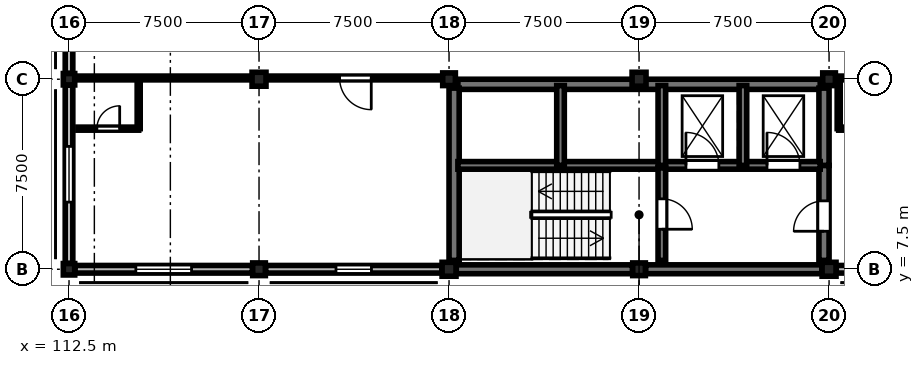
"""IFC4 building model, lengths in metres.
Left out: names, types, materials, properties, quantities, classifications, styles, units other than length and angle.
Written with IfcOpenShell. Run it as: python <this file> out.ifc"""

import sys

from ifc_helpers import new_model, si_unit, direction, frame, frame_2d, origin, origin_2d, place, context, subcontext, project, spatial, rectangle, extrude, element, fill, save


model = new_model("IFC4")
c1 = context("Model", 3, precision=1e-05, world=origin(), true_north=direction((0.0, 1.0)))
c2 = subcontext(c1, "Body", "Model", "MODEL_VIEW")
j1 = project(units=[si_unit("LENGTHUNIT", "METRE"), si_unit("PLANEANGLEUNIT", "RADIAN")], contexts=[c1])
p1 = place(None, origin())
s1 = spatial("IfcSite", under=j1, at=p1, CompositionType="ELEMENT")
p2 = place(p1, origin())
s2 = spatial("IfcBuilding", under=s1, at=p2, CompositionType="ELEMENT")
p3 = place(p2, frame((0.0, 0.0, 17.85)))
s3 = spatial("IfcBuildingStorey", under=s2, at=p3, CompositionType="ELEMENT", Elevation=17.85)
for number, where, z_axis, x_axis in (
    (1, (112.5, 7.5, 0.0), (0.0, 0.0, 1.0), (1.0, 0.0, 0.0)),
    (2, (112.5, 15.0, 0.0), (0.0, 0.0, 1.0), (1.0, 0.0, 0.0)),
):
    element("IfcColumn", number, at=place(p3, frame(where, z_axis=z_axis, x_axis=x_axis)), inside=s3, PredefinedType="COLUMN", context=c2, shape_type="SweptSolid", body=[
        extrude(rectangle(XDim=0.45, YDim=0.45, at=origin_2d()), origin(), (0.0, 0.0, 1.0), 4.05),
    ])
p4 = place(p3, frame((120.0, 7.5, 0.0), z_axis=(0.0, 0.0, 1.0), x_axis=(1.0, 0.0, 0.0)))
e3 = element("IfcColumn", 3, at=p4, inside=s3, PredefinedType="COLUMN", context=c2, shape_type="SweptSolid", body=[
    extrude(rectangle(XDim=0.5, YDim=0.5, at=origin_2d()), origin(), (0.0, 0.0, 1.0), 4.05),
])
for number, where, z_axis, x_axis in (
    (4, (120.0, 15.0, 0.0), (0.0, 0.0, 1.0), (1.0, 0.0, 0.0)),
    (5, (127.5, 7.5, 0.0), (0.0, 0.0, 1.0), (1.0, 0.0, 0.0)),
):
    element("IfcColumn", number, at=place(p3, frame(where, z_axis=z_axis, x_axis=x_axis)), inside=s3, PredefinedType="COLUMN", context=c2, shape_type="SweptSolid", body=[
        extrude(rectangle(XDim=0.55, YDim=0.55, at=origin_2d()), origin(), (0.0, 0.0, 1.0), 4.05),
    ])
for number, where, z_axis, x_axis in (
    (6, (127.5, 15.0, 0.0), (0.0, 0.0, 1.0), (1.0, 0.0, 0.0)),
    (7, (135.0, 7.5, 0.0), (0.0, 0.0, 1.0), (1.0, 0.0, 0.0)),
):
    element("IfcColumn", number, at=place(p3, frame(where, z_axis=z_axis, x_axis=x_axis)), inside=s3, PredefinedType="COLUMN", context=c2, shape_type="SweptSolid", body=[
        extrude(rectangle(XDim=0.5, YDim=0.5, at=origin_2d()), origin(), (0.0, 0.0, 1.0), 4.05),
    ])
for number, where, z_axis, x_axis in (
    (8, (135.0, 15.0, 0.0), (0.0, 0.0, 1.0), (1.0, 0.0, 0.0)),
    (9, (142.5, 7.5, 0.0), (0.0, 0.0, 1.0), (1.0, 0.0, 0.0)),
):
    element("IfcColumn", number, at=place(p3, frame(where, z_axis=z_axis, x_axis=x_axis)), inside=s3, PredefinedType="COLUMN", context=c2, shape_type="SweptSolid", body=[
        extrude(rectangle(XDim=0.55, YDim=0.55, at=origin_2d()), origin(), (0.0, 0.0, 1.0), 4.05),
    ])
p5 = place(p3, frame((142.5, 15.0, 0.0), z_axis=(0.0, 0.0, 1.0), x_axis=(1.0, 0.0, 0.0)))
e10 = element("IfcColumn", 10, at=p5, inside=s3, PredefinedType="COLUMN", context=c2, shape_type="SweptSolid", body=[
    extrude(rectangle(XDim=0.5, YDim=0.5, at=origin_2d()), origin(), (0.0, 0.0, 1.0), 4.05),
])
p6 = place(p3, frame((119.74, 7.5, 0.0), z_axis=(0.0, 0.0, 1.0), x_axis=(-1.0, 0.0, 0.0)))
e11 = element("IfcWall", 11, at=p6, inside=s3, PredefinedType="STANDARD", context=c2, shape_type="SweptSolid", body=[
    extrude(rectangle(XDim=7.005, YDim=0.3, at=frame_2d((3.502, 0.0))), origin(), (0.0, 0.0, 1.0), 3.17),
])
p7 = place(p6, frame((2.403, 0.0, 0.9)))
e12 = element("IfcOpeningElement", 12, at=p7, cuts=e11, PredefinedType="OPENING", context=c2, shape_type="SweptSolid", body=[
    extrude(rectangle(XDim=2.2, YDim=1.95, at=frame_2d((1.1, 0.975))), frame((0.0, 0.16, 0.0), z_axis=(0.0, -1.0, 0.0), x_axis=(1.0, 0.0, 0.0)), (0.0, 0.0, 1.0), 0.32),
])
p8 = place(p3, frame((112.5, 7.735, 0.0), z_axis=(0.0, 0.0, 1.0), x_axis=(0.0, 1.0, 0.0)))
e13 = element("IfcWall", 13, at=p8, inside=s3, PredefinedType="STANDARD", context=c2, shape_type="SweptSolid", body=[
    extrude(rectangle(XDim=7.03, YDim=0.3, at=frame_2d((3.515, 0.0))), origin(), (0.0, 0.0, 1.0), 3.17),
])
p9 = place(p8, frame((2.415, 0.0, 0.9)))
e14 = element("IfcOpeningElement", 14, at=p9, cuts=e13, PredefinedType="OPENING", context=c2, shape_type="SweptSolid", body=[
    extrude(rectangle(XDim=2.2, YDim=1.95, at=frame_2d((1.1, 0.975))), frame((0.0, 0.16, 0.0), z_axis=(0.0, -1.0, 0.0), x_axis=(1.0, 0.0, 0.0)), (0.0, 0.0, 1.0), 0.32),
])
p10 = place(p3, frame((112.5, 15.235, 0.0), z_axis=(0.0, 0.0, 1.0), x_axis=(0.0, 1.0, 0.0)))
e15 = element("IfcWall", 15, at=p10, inside=s3, PredefinedType="STANDARD", context=c2, shape_type="SweptSolid", body=[
    extrude(rectangle(XDim=7.115, YDim=0.3, at=frame_2d((3.558, 0.0))), origin(), (0.0, 0.0, 1.0), 3.17),
])
p11 = place(p10, frame((2.857, 0.0, 0.9)))
e16 = element("IfcOpeningElement", 16, at=p11, cuts=e15, PredefinedType="OPENING", context=c2, shape_type="SweptSolid", body=[
    extrude(rectangle(XDim=1.4, YDim=1.8, at=frame_2d((0.7, 0.9))), frame((0.0, 0.16, 0.0), z_axis=(0.0, -1.0, 0.0), x_axis=(1.0, 0.0, 0.0)), (0.0, 0.0, 1.0), 0.32),
])
p12 = place(p3, frame((127.215, 7.5, 0.0), z_axis=(0.0, 0.0, 1.0), x_axis=(-1.0, 0.0, 0.0)))
e17 = element("IfcWall", 17, at=p12, inside=s3, PredefinedType="STANDARD", context=c2, shape_type="SweptSolid", body=[
    extrude(rectangle(XDim=6.955, YDim=0.3, at=frame_2d((3.478, 0.0))), origin(), (0.0, 0.0, 1.0), 3.17),
])
p13 = place(p12, frame((2.778, 0.0, 0.9)))
e18 = element("IfcOpeningElement", 18, at=p13, cuts=e17, PredefinedType="OPENING", context=c2, shape_type="SweptSolid", body=[
    extrude(rectangle(XDim=1.4, YDim=1.8, at=frame_2d((0.7, 0.9))), frame((0.0, 0.16, 0.0), z_axis=(0.0, -1.0, 0.0), x_axis=(1.0, 0.0, 0.0)), (0.0, 0.0, 1.0), 0.32),
])
for number, where, z_axis, x_axis in (
    (19, (134.74, 7.5, 0.0), (0.0, 0.0, 1.0), (-1.0, 0.0, 0.0)),
    (20, (142.215, 7.5, 0.0), (0.0, 0.0, 1.0), (-1.0, 0.0, 0.0)),
):
    element("IfcWall", number, at=place(p3, frame(where, z_axis=z_axis, x_axis=x_axis)), inside=s3, PredefinedType="SHEAR", context=c2, shape_type="SweptSolid", body=[
        extrude(rectangle(XDim=6.955, YDim=0.35, at=frame_2d((3.478, 0.0))), origin(), (0.0, 0.0, 1.0), 3.77),
    ])
p14 = place(p3, frame((149.74, 7.5, 0.0), z_axis=(0.0, 0.0, 1.0), x_axis=(-1.0, 0.0, 0.0)))
e21 = element("IfcWall", 21, at=p14, inside=s3, PredefinedType="STANDARD", context=c2, shape_type="SweptSolid", body=[
    extrude(rectangle(XDim=6.955, YDim=0.3, at=frame_2d((3.478, 0.0))), origin(), (0.0, 0.0, 1.0), 3.17),
])
p15 = place(p14, frame((2.577, 0.0, 0.9)))
e22 = element("IfcOpeningElement", 22, at=p15, cuts=e21, PredefinedType="OPENING", context=c2, shape_type="SweptSolid", body=[
    extrude(rectangle(XDim=1.8, YDim=1.99, at=frame_2d((0.9, 0.995))), frame((0.0, 0.16, 0.0), z_axis=(0.0, -1.0, 0.0), x_axis=(1.0, 0.0, 0.0)), (0.0, 0.0, 1.0), 0.32),
])
p16 = place(p3, frame((127.85, 14.8, 0.0), z_axis=(0.0, 0.0, 1.0), x_axis=(1.0, 0.0, 0.0)))
e23 = element("IfcWall", 23, at=p16, inside=s3, PredefinedType="SHEAR", context=c2, shape_type="SweptSolid", body=[
    extrude(rectangle(XDim=14.3, YDim=0.4, at=frame_2d((7.15, 0.0))), origin(), (0.0, 0.0, 1.0), 3.77),
])
p17 = place(p3, frame((127.7, 7.85, 0.0), z_axis=(0.0, 0.0, 1.0), x_axis=(0.0, 1.0, 0.0)))
e24 = element("IfcWall", 24, at=p17, inside=s3, PredefinedType="SHEAR", context=c2, shape_type="SweptSolid", body=[
    extrude(rectangle(XDim=6.8, YDim=0.4, at=frame_2d((3.4, 0.0))), origin(), (0.0, 0.0, 1.0), 3.77),
])
p18 = place(p3, frame((142.3, 7.85, 0.0), z_axis=(0.0, 0.0, 1.0), x_axis=(0.0, 1.0, 0.0)))
e25 = element("IfcWall", 25, at=p18, inside=s3, PredefinedType="SHEAR", context=c2, shape_type="SweptSolid", body=[
    extrude(rectangle(XDim=3.75, YDim=0.4, at=frame_2d((1.875, 0.0))), origin(), (0.0, 0.0, 1.0), 3.77),
])
p19 = place(p18, frame((1.15, 0.0, 0.0)))
e26 = element("IfcOpeningElement", 26, at=p19, cuts=e25, PredefinedType="OPENING", context=c2, shape_type="SweptSolid", body=[
    extrude(rectangle(XDim=1.2, YDim=2.25, at=frame_2d((0.6, 1.125))), frame((0.0, 0.21, 0.0), z_axis=(0.0, -1.0, 0.0), x_axis=(1.0, 0.0, 0.0)), (0.0, 0.0, 1.0), 0.42),
])
p20 = place(p3, frame((142.3, 11.6, 0.0), z_axis=(0.0, 0.0, 1.0), x_axis=(0.0, 1.0, 0.0)))
e27 = element("IfcWall", 27, at=p20, inside=s3, PredefinedType="SHEAR", context=c2, shape_type="SweptSolid", body=[
    extrude(rectangle(XDim=3.05, YDim=0.4, at=frame_2d((1.525, 0.0))), origin(), (0.0, 0.0, 1.0), 3.77),
])
p21 = place(p3, frame((127.85, 11.6, 0.0), z_axis=(0.0, 0.0, 1.0), x_axis=(1.0, 0.0, 0.0)))
e28 = element("IfcWall", 28, at=p21, inside=s3, PredefinedType="SHEAR", context=c2, shape_type="SweptSolid", body=[
    extrude(rectangle(XDim=8.05, YDim=0.3, at=frame_2d((4.025, 0.0))), origin(), (0.0, 0.0, 1.0), 3.77),
])
p22 = place(p3, frame((135.9, 11.6, 0.0), z_axis=(0.0, 0.0, 1.0), x_axis=(1.0, 0.0, 0.0)))
e29 = element("IfcWall", 29, at=p22, inside=s3, PredefinedType="SHEAR", context=c2, shape_type="SweptSolid", body=[
    extrude(rectangle(XDim=6.25, YDim=0.3, at=frame_2d((3.125, 0.0))), origin(), (0.0, 0.0, 1.0), 3.77),
])
p23 = place(p22, frame((0.95, 0.0, 0.0)))
e30 = element("IfcOpeningElement", 30, at=p23, cuts=e29, PredefinedType="OPENING", context=c2, shape_type="SweptSolid", body=[
    extrude(rectangle(XDim=1.3, YDim=2.2, at=frame_2d((0.65, 1.1))), frame((0.0, 0.16, 0.0), z_axis=(0.0, -1.0, 0.0), x_axis=(1.0, 0.0, 0.0)), (0.0, 0.0, 1.0), 0.32),
])
p24 = place(p22, frame((4.15, 0.0, 0.0)))
e31 = element("IfcOpeningElement", 31, at=p24, cuts=e29, PredefinedType="OPENING", context=c2, shape_type="SweptSolid", body=[
    extrude(rectangle(XDim=1.3, YDim=2.2, at=frame_2d((0.65, 1.1))), frame((0.0, 0.16, 0.0), z_axis=(0.0, -1.0, 0.0), x_axis=(1.0, 0.0, 0.0)), (0.0, 0.0, 1.0), 0.32),
])
p25 = place(p3, frame((135.9, 11.5, 0.0), z_axis=(0.0, 0.0, 1.0), x_axis=(0.0, -1.0, 0.0)))
e32 = element("IfcWall", 32, at=p25, inside=s3, PredefinedType="SHEAR", context=c2, shape_type="SweptSolid", body=[
    extrude(rectangle(XDim=3.65, YDim=0.3, at=frame_2d((1.825, 0.0))), origin(), (0.0, 0.0, 1.0), 3.77),
])
p26 = place(p25, frame((1.22, 0.0, 0.0)))
e33 = element("IfcOpeningElement", 33, at=p26, cuts=e32, PredefinedType="OPENING", context=c2, shape_type="SweptSolid", body=[
    extrude(rectangle(XDim=1.2, YDim=2.25, at=frame_2d((0.6, 1.125))), frame((0.0, 0.16, 0.0), z_axis=(0.0, -1.0, 0.0), x_axis=(1.0, 0.0, 0.0)), (0.0, 0.0, 1.0), 0.32),
])
for number, where, z_axis, x_axis in (
    (34, (131.9, 11.6, 0.0), (0.0, 0.0, 1.0), (0.0, 1.0, 0.0)),
    (35, (135.9, 11.6, 0.0), (0.0, 0.0, 1.0), (0.0, 1.0, 0.0)),
    (36, (139.1, 11.6, 0.0), (0.0, 0.0, 1.0), (0.0, 1.0, 0.0)),
):
    element("IfcWall", number, at=place(p3, frame(where, z_axis=z_axis, x_axis=x_axis)), inside=s3, PredefinedType="SHEAR", context=c2, shape_type="SweptSolid", body=[
        extrude(rectangle(XDim=3.15, YDim=0.3, at=frame_2d((1.575, 0.0))), origin(), (0.0, 0.0, 1.0), 3.77),
    ])
p27 = place(p3, frame((127.2, 15.05, 0.0), z_axis=(0.0, 0.0, 1.0), x_axis=(-1.0, 0.0, 0.0)))
e37 = element("IfcWall", 37, at=p27, inside=s3, PredefinedType="PARTITIONING", context=c2, shape_type="SweptSolid", body=[
    extrude(rectangle(XDim=14.35, YDim=0.15, at=frame_2d((7.175, 0.0))), origin(), (0.0, 0.0, 1.0), 3.155),
])
p28 = place(p27, frame((2.77, 0.0, 0.0)))
e38 = element("IfcOpeningElement", 38, at=p28, cuts=e37, PredefinedType="OPENING", context=c2, shape_type="SweptSolid", body=[
    extrude(rectangle(XDim=1.25, YDim=2.2, at=frame_2d((0.625, 1.1))), frame((0.0, 0.085, 0.0), z_axis=(0.0, -1.0, 0.0), x_axis=(1.0, 0.0, 0.0)), (0.0, 0.0, 1.0), 0.17),
])
p29 = place(p3, frame((112.85, 13.05, 0.0), z_axis=(0.0, 0.0, 1.0), x_axis=(1.0, 0.0, 0.0)))
e39 = element("IfcWall", 39, at=p29, inside=s3, PredefinedType="PARTITIONING", context=c2, shape_type="SweptSolid", body=[
    extrude(rectangle(XDim=2.4, YDim=0.12, at=frame_2d((1.2, 0.0))), origin(), (0.0, 0.0, 1.0), 3.755),
])
p30 = place(p29, frame((0.75, 0.0, 0.0)))
e40 = element("IfcOpeningElement", 40, at=p30, cuts=e39, PredefinedType="OPENING", context=c2, shape_type="SweptSolid", body=[
    extrude(rectangle(XDim=0.9, YDim=2.1, at=frame_2d((0.45, 1.05))), frame((0.0, 0.07, 0.0), z_axis=(0.0, -1.0, 0.0), x_axis=(1.0, 0.0, 0.0)), (0.0, 0.0, 1.0), 0.14),
])
p31 = place(p3, frame((115.25, 13.05, 0.0), z_axis=(0.0, 0.0, 1.0), x_axis=(0.0, 1.0, 0.0)))
e41 = element("IfcWall", 41, at=p31, inside=s3, PredefinedType="PARTITIONING", context=c2, shape_type="SweptSolid", body=[
    extrude(rectangle(XDim=2.0, YDim=0.12, at=frame_2d((1.0, 0.0))), origin(), (0.0, 0.0, 1.0), 3.755),
])
p32 = place(p3, frame((150.058, 15.05, 0.0), z_axis=(0.0, 0.0, 1.0), x_axis=(-1.0, 0.0, 0.0)))
e42 = element("IfcWall", 42, at=p32, inside=s3, PredefinedType="PARTITIONING", context=c2, shape_type="SweptSolid", body=[
    extrude(rectangle(XDim=7.178, YDim=0.15, at=frame_2d((3.589, 0.0))), origin(), (0.0, 0.0, 1.0), 3.205),
])
p33 = place(p32, frame((2.964, 0.0, 0.0)))
e43 = element("IfcOpeningElement", 43, at=p33, cuts=e42, PredefinedType="OPENING", context=c2, shape_type="SweptSolid", body=[
    extrude(rectangle(XDim=1.25, YDim=2.2, at=frame_2d((0.625, 1.1))), frame((0.0, 0.085, 0.0), z_axis=(0.0, -1.0, 0.0), x_axis=(1.0, 0.0, 0.0)), (0.0, 0.0, 1.0), 0.17),
])
p34 = place(p3, frame((142.88, 13.05, 0.0), z_axis=(0.0, 0.0, 1.0), x_axis=(1.0, 0.0, 0.0)))
e44 = element("IfcWall", 44, at=p34, inside=s3, PredefinedType="PARTITIONING", context=c2, shape_type="SweptSolid", body=[
    extrude(rectangle(XDim=2.4, YDim=0.12, at=frame_2d((1.2, 0.0))), origin(), (0.0, 0.0, 1.0), 3.755),
])
p35 = place(p34, frame((0.75, 0.0, 0.0)))
e45 = element("IfcOpeningElement", 45, at=p35, cuts=e44, PredefinedType="OPENING", context=c2, shape_type="SweptSolid", body=[
    extrude(rectangle(XDim=0.9, YDim=2.1, at=frame_2d((0.45, 1.05))), frame((0.0, 0.07, 0.0), z_axis=(0.0, -1.0, 0.0), x_axis=(1.0, 0.0, 0.0)), (0.0, 0.0, 1.0), 0.14),
])
p36 = place(p3, frame((142.88, 13.05, 0.0), z_axis=(0.0, 0.0, 1.0), x_axis=(0.0, 1.0, 0.0)))
e46 = element("IfcWall", 46, at=p36, inside=s3, PredefinedType="PARTITIONING", context=c2, shape_type="SweptSolid", body=[
    extrude(rectangle(XDim=2.0, YDim=0.12, at=frame_2d((1.0, 0.0))), origin(), (0.0, 0.0, 1.0), 3.205),
])
p37 = place(p7, origin())
e47 = element("IfcWindow", 47, at=p37, inside=s3, PartitioningType="SINGLE_PANEL", PredefinedType="WINDOW", context=c2, shape_type="SweptSolid", body=[
    extrude(rectangle(XDim=2.2, YDim=1.95, at=frame_2d((1.1, 0.975))), frame((0.0, 0.03, 0.0), z_axis=(0.0, -1.0, 0.0), x_axis=(1.0, 0.0, 0.0)), (0.0, 0.0, 1.0), 0.06),
])
fill(e12, e47)
p38 = place(p9, origin())
e48 = element("IfcWindow", 48, at=p38, inside=s3, PartitioningType="SINGLE_PANEL", PredefinedType="WINDOW", context=c2, shape_type="SweptSolid", body=[
    extrude(rectangle(XDim=2.2, YDim=1.95, at=frame_2d((1.1, 0.975))), frame((0.0, 0.03, 0.0), z_axis=(0.0, -1.0, 0.0), x_axis=(1.0, 0.0, 0.0)), (0.0, 0.0, 1.0), 0.06),
])
fill(e14, e48)
p39 = place(p13, origin())
e49 = element("IfcWindow", 49, at=p39, inside=s3, PartitioningType="SINGLE_PANEL", PredefinedType="WINDOW", context=c2, shape_type="SweptSolid", body=[
    extrude(rectangle(XDim=1.4, YDim=1.8, at=frame_2d((0.7, 0.9))), frame((0.0, 0.03, 0.0), z_axis=(0.0, -1.0, 0.0), x_axis=(1.0, 0.0, 0.0)), (0.0, 0.0, 1.0), 0.06),
])
fill(e18, e49)
p40 = place(p19, origin())
e50 = element("IfcDoor", 50, at=p40, inside=s3, OperationType="SINGLE_SWING_LEFT", PredefinedType="DOOR", context=c2, shape_type="SweptSolid", body=[
    extrude(rectangle(XDim=1.2, YDim=2.25, at=frame_2d((0.6, 1.125))), frame((0.0, 0.025, 0.0), z_axis=(0.0, -1.0, 0.0), x_axis=(1.0, 0.0, 0.0)), (0.0, 0.0, 1.0), 0.05),
])
fill(e26, e50)
p41 = place(p23, origin())
e51 = element("IfcDoor", 51, at=p41, inside=s3, OperationType="DOUBLE_DOOR_SLIDING", PredefinedType="DOOR", context=c2, shape_type="SweptSolid", body=[
    extrude(rectangle(XDim=1.3, YDim=2.2, at=frame_2d((0.65, 1.1))), frame((0.0, 0.025, 0.0), z_axis=(0.0, -1.0, 0.0), x_axis=(1.0, 0.0, 0.0)), (0.0, 0.0, 1.0), 0.05),
])
fill(e30, e51)
p42 = place(p24, origin())
e52 = element("IfcDoor", 52, at=p42, inside=s3, OperationType="DOUBLE_DOOR_SLIDING", PredefinedType="DOOR", context=c2, shape_type="SweptSolid", body=[
    extrude(rectangle(XDim=1.3, YDim=2.2, at=frame_2d((0.65, 1.1))), frame((0.0, 0.025, 0.0), z_axis=(0.0, -1.0, 0.0), x_axis=(1.0, 0.0, 0.0)), (0.0, 0.0, 1.0), 0.05),
])
fill(e31, e52)
p43 = place(p26, origin())
e53 = element("IfcDoor", 53, at=p43, inside=s3, OperationType="SINGLE_SWING_RIGHT", PredefinedType="DOOR", context=c2, shape_type="SweptSolid", body=[
    extrude(rectangle(XDim=1.2, YDim=2.25, at=frame_2d((0.6, 1.125))), frame((0.0, 0.025, 0.0), z_axis=(0.0, -1.0, 0.0), x_axis=(1.0, 0.0, 0.0)), (0.0, 0.0, 1.0), 0.05),
])
fill(e33, e53)
p44 = place(p28, origin())
e54 = element("IfcDoor", 54, at=p44, inside=s3, OperationType="SINGLE_SWING_LEFT", PredefinedType="DOOR", context=c2, shape_type="SweptSolid", body=[
    extrude(rectangle(XDim=1.25, YDim=2.2, at=frame_2d((0.625, 1.1))), frame((0.0, 0.025, 0.0), z_axis=(0.0, -1.0, 0.0), x_axis=(1.0, 0.0, 0.0)), (0.0, 0.0, 1.0), 0.05),
])
fill(e38, e54)
p45 = place(p30, origin())
e55 = element("IfcDoor", 55, at=p45, inside=s3, OperationType="SINGLE_SWING_RIGHT", PredefinedType="DOOR", context=c2, shape_type="SweptSolid", body=[
    extrude(rectangle(XDim=0.9, YDim=2.1, at=frame_2d((0.45, 1.05))), frame((0.0, 0.025, 0.0), z_axis=(0.0, -1.0, 0.0), x_axis=(1.0, 0.0, 0.0)), (0.0, 0.0, 1.0), 0.05),
])
fill(e40, e55)
save(model, sys.argv[1])
